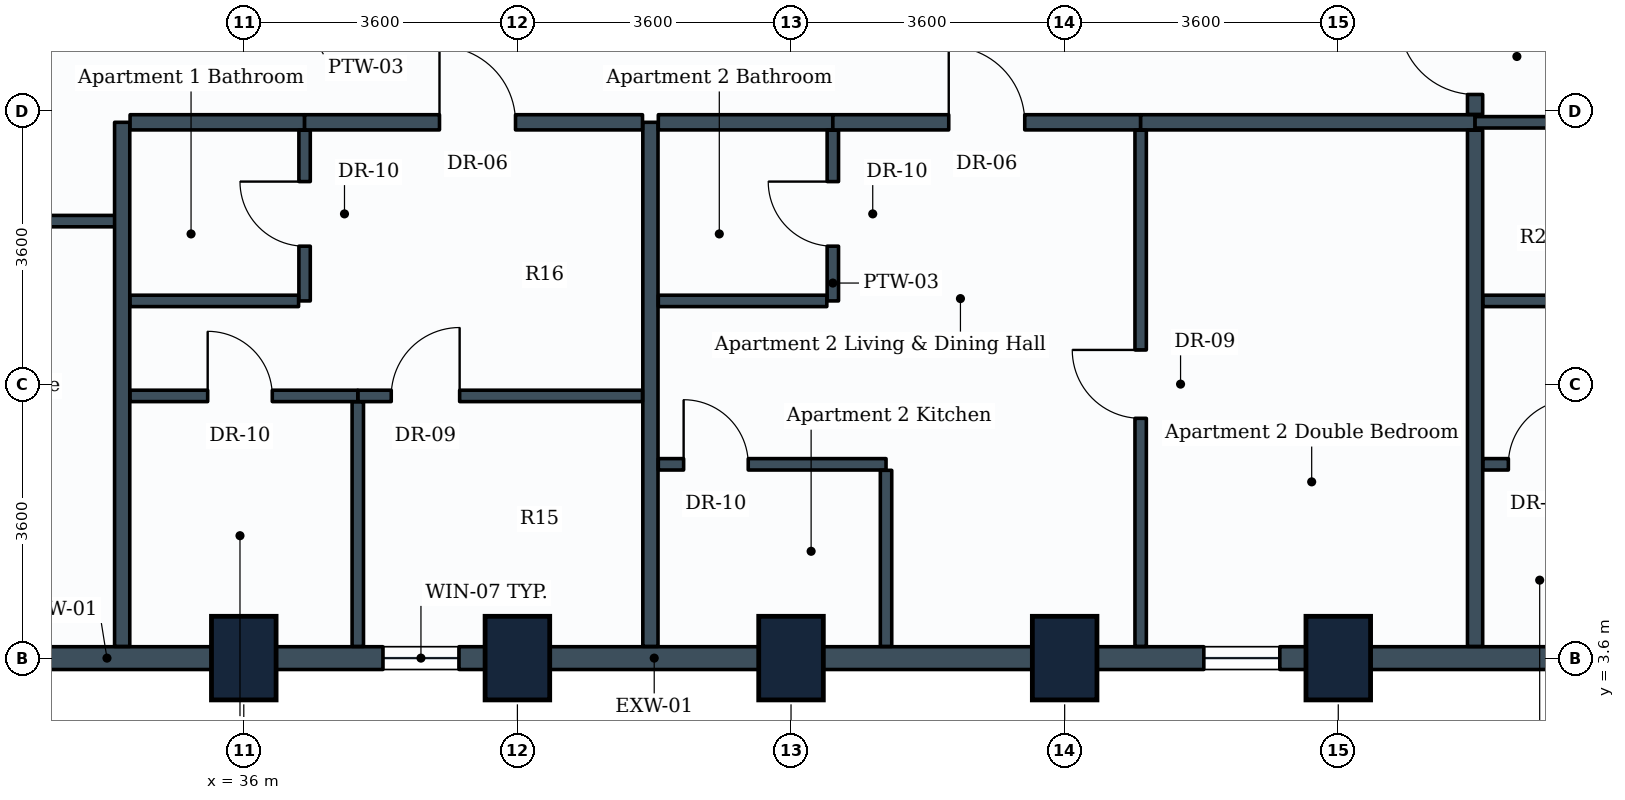
"""IFC4 building model, lengths in metres.
Left out: names, types, materials, properties, quantities, classifications, styles, units other than length and angle.
Written with IfcOpenShell. Run it as: python <this file> out.ifc"""

import sys

from ifc_helpers import new_model, si_unit, direction, frame, frame_2d, origin, origin_2d, place, context, subcontext, project, spatial, rectangle, extrude, element, fill, save


model = new_model("IFC4")
c1 = context("Model", 3, precision=1e-05, world=origin(), true_north=direction((0.0, 1.0)))
c2 = subcontext(c1, "Body", "Model", "MODEL_VIEW")
j1 = project(units=[si_unit("LENGTHUNIT", "METRE"), si_unit("PLANEANGLEUNIT", "RADIAN")], contexts=[c1])
p1 = place(None, origin())
s1 = spatial("IfcSite", under=j1, at=p1, CompositionType="ELEMENT")
p2 = place(p1, origin())
s2 = spatial("IfcBuilding", under=s1, at=p2, CompositionType="ELEMENT")
p3 = place(p2, frame((0.0, 0.0, 123.8)))
s3 = spatial("IfcBuildingStorey", under=s2, at=p3, CompositionType="ELEMENT", Elevation=123.8)
for number, where, z_axis, x_axis in (
    (1, (36.0, 3.6, 0.0), (0.0, 0.0, 1.0), (1.0, 0.0, 0.0)),
    (2, (39.6, 3.6, 0.0), (0.0, 0.0, 1.0), (1.0, 0.0, 0.0)),
    (3, (43.2, 3.6, 0.0), (0.0, 0.0, 1.0), (1.0, 0.0, 0.0)),
    (4, (46.8, 3.6, 0.0), (0.0, 0.0, 1.0), (1.0, 0.0, 0.0)),
    (5, (50.4, 3.6, 0.0), (0.0, 0.0, 1.0), (1.0, 0.0, 0.0)),
):
    element("IfcColumn", number, at=place(p3, frame(where, z_axis=z_axis, x_axis=x_axis)), inside=s3, PredefinedType="COLUMN", context=c2, shape_type="SweptSolid", body=[
        extrude(rectangle(XDim=0.85, YDim=1.1, at=origin_2d()), origin(), (0.0, 0.0, 1.0), 3.8),
    ])
p4 = place(p3, frame((36.0, 3.6, 0.0), z_axis=(0.0, 0.0, 1.0), x_axis=(-1.0, 0.0, 0.0)))
e6 = element("IfcWall", 6, at=p4, inside=s3, PredefinedType="STANDARD", context=c2, shape_type="SweptSolid", body=[
    extrude(rectangle(XDim=3.6, YDim=0.3, at=frame_2d((1.8, 0.0))), origin(), (0.0, 0.0, 1.0), 2.93),
])
p5 = place(p3, frame((39.6, 3.6, 0.0), z_axis=(0.0, 0.0, 1.0), x_axis=(-1.0, 0.0, 0.0)))
e7 = element("IfcWall", 7, at=p5, inside=s3, PredefinedType="STANDARD", context=c2, shape_type="SweptSolid", body=[
    extrude(rectangle(XDim=3.6, YDim=0.3, at=frame_2d((1.8, 0.0))), origin(), (0.0, 0.0, 1.0), 2.93),
])
p6 = place(p5, frame((0.769, 0.0, 0.85)))
e8 = element("IfcOpeningElement", 8, at=p6, cuts=e7, PredefinedType="OPENING", context=c2, shape_type="SweptSolid", body=[
    extrude(rectangle(XDim=1.0, YDim=1.35, at=frame_2d((0.5, 0.675))), frame((0.0, 0.16, 0.0), z_axis=(0.0, -1.0, 0.0), x_axis=(1.0, 0.0, 0.0)), (0.0, 0.0, 1.0), 0.32),
])
p7 = place(p3, frame((43.2, 3.6, 0.0), z_axis=(0.0, 0.0, 1.0), x_axis=(-1.0, 0.0, 0.0)))
e9 = element("IfcWall", 9, at=p7, inside=s3, PredefinedType="STANDARD", context=c2, shape_type="SweptSolid", body=[
    extrude(rectangle(XDim=3.6, YDim=0.3, at=frame_2d((1.8, 0.0))), origin(), (0.0, 0.0, 1.0), 2.93),
])
p8 = place(p3, frame((46.8, 3.6, 0.0), z_axis=(0.0, 0.0, 1.0), x_axis=(-1.0, 0.0, 0.0)))
e10 = element("IfcWall", 10, at=p8, inside=s3, PredefinedType="STANDARD", context=c2, shape_type="SweptSolid", body=[
    extrude(rectangle(XDim=3.6, YDim=0.3, at=frame_2d((1.8, 0.0))), origin(), (0.0, 0.0, 1.0), 2.93),
])
p9 = place(p3, frame((50.4, 3.6, 0.0), z_axis=(0.0, 0.0, 1.0), x_axis=(-1.0, 0.0, 0.0)))
e11 = element("IfcWall", 11, at=p9, inside=s3, PredefinedType="STANDARD", context=c2, shape_type="SweptSolid", body=[
    extrude(rectangle(XDim=3.6, YDim=0.3, at=frame_2d((1.8, 0.0))), origin(), (0.0, 0.0, 1.0), 2.93),
])
p10 = place(p9, frame((0.769, 0.0, 0.85)))
e12 = element("IfcOpeningElement", 12, at=p10, cuts=e11, PredefinedType="OPENING", context=c2, shape_type="SweptSolid", body=[
    extrude(rectangle(XDim=1.0, YDim=1.35, at=frame_2d((0.5, 0.675))), frame((0.0, 0.16, 0.0), z_axis=(0.0, -1.0, 0.0), x_axis=(1.0, 0.0, 0.0)), (0.0, 0.0, 1.0), 0.32),
])
p11 = place(p3, frame((54.0, 3.6, 0.0), z_axis=(0.0, 0.0, 1.0), x_axis=(-1.0, 0.0, 0.0)))
e13 = element("IfcWall", 13, at=p11, inside=s3, PredefinedType="STANDARD", context=c2, shape_type="SweptSolid", body=[
    extrude(rectangle(XDim=3.6, YDim=0.3, at=frame_2d((1.8, 0.0))), origin(), (0.0, 0.0, 1.0), 2.43),
])
p12 = place(p3, frame((28.879, 9.35, 0.0), z_axis=(0.0, 0.0, 1.0), x_axis=(1.0, 0.0, 0.0)))
e14 = element("IfcWall", 14, at=p12, inside=s3, PredefinedType="PARTITIONING", context=c2, shape_type="SweptSolid", body=[
    extrude(rectangle(XDim=5.521, YDim=0.15, at=frame_2d((2.76, 0.0))), origin(), (0.0, 0.0, 1.0), 3.465),
])
p13 = place(p12, frame((0.36, 0.0, 0.0)))
e15 = element("IfcOpeningElement", 15, at=p13, cuts=e14, PredefinedType="OPENING", context=c2, shape_type="SweptSolid", body=[
    extrude(rectangle(XDim=1.0, YDim=2.1, at=frame_2d((0.5, 1.05))), frame((0.0, 0.085, 0.0), z_axis=(0.0, -1.0, 0.0), x_axis=(1.0, 0.0, 0.0)), (0.0, 0.0, 1.0), 0.17),
])
for number, where, z_axis, x_axis in (
    (16, (34.4, 3.754, 0.0), (0.0, 0.0, 1.0), (0.0, 1.0, 0.0)),
    (17, (41.35, 3.754, 0.0), (0.0, 0.0, 1.0), (0.0, 1.0, 0.0)),
):
    element("IfcWall", number, at=place(p3, frame(where, z_axis=z_axis, x_axis=x_axis)), inside=s3, PredefinedType="PARTITIONING", context=c2, shape_type="SweptSolid", body=[
        extrude(rectangle(XDim=6.896, YDim=0.2, at=frame_2d((3.448, 0.0))), origin(), (0.0, 0.0, 1.0), 2.93),
    ])
p14 = place(p3, frame((34.504, 10.65, 0.0), z_axis=(0.0, 0.0, 1.0), x_axis=(1.0, 0.0, 0.0)))
e18 = element("IfcWall", 18, at=p14, inside=s3, PredefinedType="PARTITIONING", context=c2, shape_type="SweptSolid", body=[
    extrude(rectangle(XDim=2.296, YDim=0.2, at=frame_2d((1.148, 0.0))), origin(), (0.0, 0.0, 1.0), 3.01),
])
p15 = place(p3, frame((36.8, 8.3, 0.0), z_axis=(0.0, 0.0, 1.0), x_axis=(0.0, 1.0, 0.0)))
e19 = element("IfcWall", 19, at=p15, inside=s3, PredefinedType="PARTITIONING", context=c2, shape_type="SweptSolid", body=[
    extrude(rectangle(XDim=2.246, YDim=0.15, at=frame_2d((1.123, 0.0))), origin(), (0.0, 0.0, 1.0), 3.465),
])
p16 = place(p15, frame((0.72, 0.0, 0.0)))
e20 = element("IfcOpeningElement", 20, at=p16, cuts=e19, PredefinedType="OPENING", context=c2, shape_type="SweptSolid", body=[
    extrude(rectangle(XDim=0.85, YDim=2.1, at=frame_2d((0.425, 1.05))), frame((0.0, 0.085, 0.0), z_axis=(0.0, -1.0, 0.0), x_axis=(1.0, 0.0, 0.0)), (0.0, 0.0, 1.0), 0.17),
])
p17 = place(p3, frame((34.504, 8.3, 0.0), z_axis=(0.0, 0.0, 1.0), x_axis=(1.0, 0.0, 0.0)))
e21 = element("IfcWall", 21, at=p17, inside=s3, PredefinedType="PARTITIONING", context=c2, shape_type="SweptSolid", body=[
    extrude(rectangle(XDim=2.217, YDim=0.15, at=frame_2d((1.108, 0.0))), origin(), (0.0, 0.0, 1.0), 3.1),
])
p18 = place(p3, frame((36.8, 10.65, 0.0), z_axis=(0.0, 0.0, 1.0), x_axis=(1.0, 0.0, 0.0)))
e22 = element("IfcWall", 22, at=p18, inside=s3, PredefinedType="PARTITIONING", context=c2, shape_type="SweptSolid", body=[
    extrude(rectangle(XDim=4.446, YDim=0.2, at=frame_2d((2.223, 0.0))), origin(), (0.0, 0.0, 1.0), 3.01),
])
p19 = place(p18, frame((1.775, 0.0, 0.0)))
e23 = element("IfcOpeningElement", 23, at=p19, cuts=e22, PredefinedType="OPENING", context=c2, shape_type="SweptSolid", body=[
    extrude(rectangle(XDim=1.0, YDim=2.1, at=frame_2d((0.5, 1.05))), frame((0.0, 0.11, 0.0), z_axis=(0.0, -1.0, 0.0), x_axis=(1.0, 0.0, 0.0)), (0.0, 0.0, 1.0), 0.22),
])
p20 = place(p3, frame((37.5, 7.05, 0.0), z_axis=(0.0, 0.0, 1.0), x_axis=(1.0, 0.0, 0.0)))
e24 = element("IfcWall", 24, at=p20, inside=s3, PredefinedType="PARTITIONING", context=c2, shape_type="SweptSolid", body=[
    extrude(rectangle(XDim=3.746, YDim=0.15, at=frame_2d((1.873, 0.0))), origin(), (0.0, 0.0, 1.0), 3.01),
])
p21 = place(p20, frame((0.44, 0.0, 0.0)))
e25 = element("IfcOpeningElement", 25, at=p21, cuts=e24, PredefinedType="OPENING", context=c2, shape_type="SweptSolid", body=[
    extrude(rectangle(XDim=0.9, YDim=2.1, at=frame_2d((0.45, 1.05))), frame((0.0, 0.085, 0.0), z_axis=(0.0, -1.0, 0.0), x_axis=(1.0, 0.0, 0.0)), (0.0, 0.0, 1.0), 0.17),
])
p22 = place(p3, frame((34.504, 7.05, 0.0), z_axis=(0.0, 0.0, 1.0), x_axis=(1.0, 0.0, 0.0)))
e26 = element("IfcWall", 26, at=p22, inside=s3, PredefinedType="PARTITIONING", context=c2, shape_type="SweptSolid", body=[
    extrude(rectangle(XDim=2.996, YDim=0.15, at=frame_2d((1.498, 0.0))), origin(), (0.0, 0.0, 1.0), 3.01),
])
p23 = place(p22, frame((1.021, 0.0, 0.0)))
e27 = element("IfcOpeningElement", 27, at=p23, cuts=e26, PredefinedType="OPENING", context=c2, shape_type="SweptSolid", body=[
    extrude(rectangle(XDim=0.85, YDim=2.1, at=frame_2d((0.425, 1.05))), frame((0.0, 0.085, 0.0), z_axis=(0.0, -1.0, 0.0), x_axis=(1.0, 0.0, 0.0)), (0.0, 0.0, 1.0), 0.17),
])
p24 = place(p3, frame((37.5, 3.754, 0.0), z_axis=(0.0, 0.0, 1.0), x_axis=(0.0, 1.0, 0.0)))
e28 = element("IfcWall", 28, at=p24, inside=s3, PredefinedType="PARTITIONING", context=c2, shape_type="SweptSolid", body=[
    extrude(rectangle(XDim=3.217, YDim=0.15, at=frame_2d((1.608, 0.0))), origin(), (0.0, 0.0, 1.0), 2.93),
])
p25 = place(p3, frame((41.454, 10.65, 0.0), z_axis=(0.0, 0.0, 1.0), x_axis=(1.0, 0.0, 0.0)))
e29 = element("IfcWall", 29, at=p25, inside=s3, PredefinedType="PARTITIONING", context=c2, shape_type="SweptSolid", body=[
    extrude(rectangle(XDim=2.296, YDim=0.2, at=frame_2d((1.148, 0.0))), origin(), (0.0, 0.0, 1.0), 3.06),
])
p26 = place(p3, frame((43.75, 8.3, 0.0), z_axis=(0.0, 0.0, 1.0), x_axis=(0.0, 1.0, 0.0)))
e30 = element("IfcWall", 30, at=p26, inside=s3, PredefinedType="PARTITIONING", context=c2, shape_type="SweptSolid", body=[
    extrude(rectangle(XDim=2.246, YDim=0.15, at=frame_2d((1.123, 0.0))), origin(), (0.0, 0.0, 1.0), 3.465),
])
p27 = place(p26, frame((0.72, 0.0, 0.0)))
e31 = element("IfcOpeningElement", 31, at=p27, cuts=e30, PredefinedType="OPENING", context=c2, shape_type="SweptSolid", body=[
    extrude(rectangle(XDim=0.85, YDim=2.1, at=frame_2d((0.425, 1.05))), frame((0.0, 0.085, 0.0), z_axis=(0.0, -1.0, 0.0), x_axis=(1.0, 0.0, 0.0)), (0.0, 0.0, 1.0), 0.17),
])
p28 = place(p3, frame((41.454, 8.3, 0.0), z_axis=(0.0, 0.0, 1.0), x_axis=(1.0, 0.0, 0.0)))
e32 = element("IfcWall", 32, at=p28, inside=s3, PredefinedType="PARTITIONING", context=c2, shape_type="SweptSolid", body=[
    extrude(rectangle(XDim=2.217, YDim=0.15, at=frame_2d((1.108, 0.0))), origin(), (0.0, 0.0, 1.0), 3.15),
])
p29 = place(p3, frame((43.75, 10.65, 0.0), z_axis=(0.0, 0.0, 1.0), x_axis=(1.0, 0.0, 0.0)))
e33 = element("IfcWall", 33, at=p29, inside=s3, PredefinedType="PARTITIONING", context=c2, shape_type="SweptSolid", body=[
    extrude(rectangle(XDim=4.05, YDim=0.2, at=frame_2d((2.025, 0.0))), origin(), (0.0, 0.0, 1.0), 3.1),
])
p30 = place(p29, frame((1.525, 0.0, 0.0)))
e34 = element("IfcOpeningElement", 34, at=p30, cuts=e33, PredefinedType="OPENING", context=c2, shape_type="SweptSolid", body=[
    extrude(rectangle(XDim=1.0, YDim=2.1, at=frame_2d((0.5, 1.05))), frame((0.0, 0.11, 0.0), z_axis=(0.0, -1.0, 0.0), x_axis=(1.0, 0.0, 0.0)), (0.0, 0.0, 1.0), 0.22),
])
p31 = place(p3, frame((47.8, 10.65, 0.0), z_axis=(0.0, 0.0, 1.0), x_axis=(1.0, 0.0, 0.0)))
e35 = element("IfcWall", 35, at=p31, inside=s3, PredefinedType="PARTITIONING", context=c2, shape_type="SweptSolid", body=[
    extrude(rectangle(XDim=4.4, YDim=0.2, at=frame_2d((2.2, 0.0))), origin(), (0.0, 0.0, 1.0), 3.465),
])
p32 = place(p3, frame((47.8, 3.754, 0.0), z_axis=(0.0, 0.0, 1.0), x_axis=(0.0, 1.0, 0.0)))
e36 = element("IfcWall", 36, at=p32, inside=s3, PredefinedType="PARTITIONING", context=c2, shape_type="SweptSolid", body=[
    extrude(rectangle(XDim=6.792, YDim=0.15, at=frame_2d((3.396, 0.0))), origin(), (0.0, 0.0, 1.0), 2.93),
])
p33 = place(p32, frame((3.001, 0.0, 0.0)))
e37 = element("IfcOpeningElement", 37, at=p33, cuts=e36, PredefinedType="OPENING", context=c2, shape_type="SweptSolid", body=[
    extrude(rectangle(XDim=0.9, YDim=2.1, at=frame_2d((0.45, 1.05))), frame((0.0, 0.085, 0.0), z_axis=(0.0, -1.0, 0.0), x_axis=(1.0, 0.0, 0.0)), (0.0, 0.0, 1.0), 0.17),
])
p34 = place(p3, frame((41.454, 6.15, 0.0), z_axis=(0.0, 0.0, 1.0), x_axis=(1.0, 0.0, 0.0)))
e38 = element("IfcWall", 38, at=p34, inside=s3, PredefinedType="PARTITIONING", context=c2, shape_type="SweptSolid", body=[
    extrude(rectangle(XDim=2.996, YDim=0.15, at=frame_2d((1.498, 0.0))), origin(), (0.0, 0.0, 1.0), 3.15),
])
p35 = place(p34, frame((0.333, 0.0, 0.0)))
e39 = element("IfcOpeningElement", 39, at=p35, cuts=e38, PredefinedType="OPENING", context=c2, shape_type="SweptSolid", body=[
    extrude(rectangle(XDim=0.85, YDim=2.1, at=frame_2d((0.425, 1.05))), frame((0.0, 0.085, 0.0), z_axis=(0.0, -1.0, 0.0), x_axis=(1.0, 0.0, 0.0)), (0.0, 0.0, 1.0), 0.17),
])
p36 = place(p3, frame((44.45, 3.754, 0.0), z_axis=(0.0, 0.0, 1.0), x_axis=(0.0, 1.0, 0.0)))
e40 = element("IfcWall", 40, at=p36, inside=s3, PredefinedType="PARTITIONING", context=c2, shape_type="SweptSolid", body=[
    extrude(rectangle(XDim=2.317, YDim=0.15, at=frame_2d((1.159, 0.0))), origin(), (0.0, 0.0, 1.0), 2.93),
])
p37 = place(p3, frame((52.2, 3.754, 0.0), z_axis=(0.0, 0.0, 1.0), x_axis=(0.0, 1.0, 0.0)))
e41 = element("IfcWall", 41, at=p37, inside=s3, PredefinedType="PARTITIONING", context=c2, shape_type="SweptSolid", body=[
    extrude(rectangle(XDim=6.792, YDim=0.2, at=frame_2d((3.396, 0.0))), origin(), (0.0, 0.0, 1.0), 3.465),
])
p38 = place(p3, frame((52.2, 10.754, 0.0), z_axis=(0.0, 0.0, 1.0), x_axis=(0.0, 1.0, 0.0)))
e42 = element("IfcWall", 42, at=p38, inside=s3, PredefinedType="PARTITIONING", context=c2, shape_type="SweptSolid", body=[
    extrude(rectangle(XDim=1.667, YDim=0.2, at=frame_2d((0.833, 0.0))), origin(), (0.0, 0.0, 1.0), 3.465),
])
p39 = place(p38, frame((0.262, 0.0, 0.0)))
e43 = element("IfcOpeningElement", 43, at=p39, cuts=e42, PredefinedType="OPENING", context=c2, shape_type="SweptSolid", body=[
    extrude(rectangle(XDim=1.0, YDim=2.1, at=frame_2d((0.5, 1.05))), frame((0.0, 0.11, 0.0), z_axis=(0.0, -1.0, 0.0), x_axis=(1.0, 0.0, 0.0)), (0.0, 0.0, 1.0), 0.22),
])
p40 = place(p3, frame((52.2, 10.65, 0.0), z_axis=(0.0, 0.0, 1.0), x_axis=(1.0, 0.0, 0.0)))
e44 = element("IfcWall", 44, at=p40, inside=s3, PredefinedType="PARTITIONING", context=c2, shape_type="SweptSolid", body=[
    extrude(rectangle(XDim=2.4, YDim=0.15, at=frame_2d((1.2, 0.0))), origin(), (0.0, 0.0, 1.0), 2.43),
])
p41 = place(p3, frame((52.304, 8.3, 0.0), z_axis=(0.0, 0.0, 1.0), x_axis=(1.0, 0.0, 0.0)))
e45 = element("IfcWall", 45, at=p41, inside=s3, PredefinedType="PARTITIONING", context=c2, shape_type="SweptSolid", body=[
    extrude(rectangle(XDim=2.217, YDim=0.15, at=frame_2d((1.108, 0.0))), origin(), (0.0, 0.0, 1.0), 2.43),
])
p42 = place(p3, frame((52.304, 6.15, 0.0), z_axis=(0.0, 0.0, 1.0), x_axis=(1.0, 0.0, 0.0)))
e46 = element("IfcWall", 46, at=p42, inside=s3, PredefinedType="PARTITIONING", context=c2, shape_type="SweptSolid", body=[
    extrude(rectangle(XDim=3.342, YDim=0.15, at=frame_2d((1.671, 0.0))), origin(), (0.0, 0.0, 1.0), 2.43),
])
p43 = place(p42, frame((0.334, 0.0, 0.0)))
e47 = element("IfcOpeningElement", 47, at=p43, cuts=e46, PredefinedType="OPENING", context=c2, shape_type="SweptSolid", body=[
    extrude(rectangle(XDim=0.85, YDim=2.1, at=frame_2d((0.425, 1.05))), frame((0.0, 0.085, 0.0), z_axis=(0.0, -1.0, 0.0), x_axis=(1.0, 0.0, 0.0)), (0.0, 0.0, 1.0), 0.17),
])
p44 = place(p16, origin())
e48 = element("IfcDoor", 48, at=p44, inside=s3, OperationType="SINGLE_SWING_RIGHT", PredefinedType="DOOR", context=c2, shape_type="SweptSolid", body=[
    extrude(rectangle(XDim=0.85, YDim=2.1, at=frame_2d((0.425, 1.05))), frame((0.0, 0.025, 0.0), z_axis=(0.0, -1.0, 0.0), x_axis=(1.0, 0.0, 0.0)), (0.0, 0.0, 1.0), 0.05),
])
fill(e20, e48)
p45 = place(p19, origin())
e49 = element("IfcDoor", 49, at=p45, inside=s3, OperationType="SINGLE_SWING_LEFT", PredefinedType="DOOR", context=c2, shape_type="SweptSolid", body=[
    extrude(rectangle(XDim=1.0, YDim=2.1, at=frame_2d((0.5, 1.05))), frame((0.0, 0.025, 0.0), z_axis=(0.0, -1.0, 0.0), x_axis=(1.0, 0.0, 0.0)), (0.0, 0.0, 1.0), 0.05),
])
fill(e23, e49)
p46 = place(p21, origin())
e50 = element("IfcDoor", 50, at=p46, inside=s3, OperationType="SINGLE_SWING_RIGHT", PredefinedType="DOOR", context=c2, shape_type="SweptSolid", body=[
    extrude(rectangle(XDim=0.9, YDim=2.1, at=frame_2d((0.45, 1.05))), frame((0.0, 0.025, 0.0), z_axis=(0.0, -1.0, 0.0), x_axis=(1.0, 0.0, 0.0)), (0.0, 0.0, 1.0), 0.05),
])
fill(e25, e50)
p47 = place(p23, origin())
e51 = element("IfcDoor", 51, at=p47, inside=s3, OperationType="SINGLE_SWING_LEFT", PredefinedType="DOOR", context=c2, shape_type="SweptSolid", body=[
    extrude(rectangle(XDim=0.85, YDim=2.1, at=frame_2d((0.425, 1.05))), frame((0.0, 0.025, 0.0), z_axis=(0.0, -1.0, 0.0), x_axis=(1.0, 0.0, 0.0)), (0.0, 0.0, 1.0), 0.05),
])
fill(e27, e51)
p48 = place(p27, origin())
e52 = element("IfcDoor", 52, at=p48, inside=s3, OperationType="SINGLE_SWING_RIGHT", PredefinedType="DOOR", context=c2, shape_type="SweptSolid", body=[
    extrude(rectangle(XDim=0.85, YDim=2.1, at=frame_2d((0.425, 1.05))), frame((0.0, 0.025, 0.0), z_axis=(0.0, -1.0, 0.0), x_axis=(1.0, 0.0, 0.0)), (0.0, 0.0, 1.0), 0.05),
])
fill(e31, e52)
p49 = place(p30, origin())
e53 = element("IfcDoor", 53, at=p49, inside=s3, OperationType="SINGLE_SWING_LEFT", PredefinedType="DOOR", context=c2, shape_type="SweptSolid", body=[
    extrude(rectangle(XDim=1.0, YDim=2.1, at=frame_2d((0.5, 1.05))), frame((0.0, 0.025, 0.0), z_axis=(0.0, -1.0, 0.0), x_axis=(1.0, 0.0, 0.0)), (0.0, 0.0, 1.0), 0.05),
])
fill(e34, e53)
p50 = place(p33, origin())
e54 = element("IfcDoor", 54, at=p50, inside=s3, OperationType="SINGLE_SWING_RIGHT", PredefinedType="DOOR", context=c2, shape_type="SweptSolid", body=[
    extrude(rectangle(XDim=0.9, YDim=2.1, at=frame_2d((0.45, 1.05))), frame((0.0, 0.025, 0.0), z_axis=(0.0, -1.0, 0.0), x_axis=(1.0, 0.0, 0.0)), (0.0, 0.0, 1.0), 0.05),
])
fill(e37, e54)
p51 = place(p35, origin())
e55 = element("IfcDoor", 55, at=p51, inside=s3, OperationType="SINGLE_SWING_LEFT", PredefinedType="DOOR", context=c2, shape_type="SweptSolid", body=[
    extrude(rectangle(XDim=0.85, YDim=2.1, at=frame_2d((0.425, 1.05))), frame((0.0, 0.025, 0.0), z_axis=(0.0, -1.0, 0.0), x_axis=(1.0, 0.0, 0.0)), (0.0, 0.0, 1.0), 0.05),
])
fill(e39, e55)
p52 = place(p39, origin())
e56 = element("IfcDoor", 56, at=p52, inside=s3, OperationType="SINGLE_SWING_RIGHT", PredefinedType="DOOR", context=c2, shape_type="SweptSolid", body=[
    extrude(rectangle(XDim=1.0, YDim=2.1, at=frame_2d((0.5, 1.05))), frame((0.0, 0.025, 0.0), z_axis=(0.0, -1.0, 0.0), x_axis=(1.0, 0.0, 0.0)), (0.0, 0.0, 1.0), 0.05),
])
fill(e43, e56)
p53 = place(p43, origin())
e57 = element("IfcDoor", 57, at=p53, inside=s3, OperationType="SINGLE_SWING_RIGHT", PredefinedType="DOOR", context=c2, shape_type="SweptSolid", body=[
    extrude(rectangle(XDim=0.85, YDim=2.1, at=frame_2d((0.425, 1.05))), frame((0.0, 0.025, 0.0), z_axis=(0.0, -1.0, 0.0), x_axis=(1.0, 0.0, 0.0)), (0.0, 0.0, 1.0), 0.05),
])
fill(e47, e57)
p54 = place(p6, origin())
e58 = element("IfcWindow", 58, at=p54, inside=s3, PartitioningType="SINGLE_PANEL", PredefinedType="WINDOW", context=c2, shape_type="SweptSolid", body=[
    extrude(rectangle(XDim=1.0, YDim=1.35, at=frame_2d((0.5, 0.675))), frame((0.0, 0.03, 0.0), z_axis=(0.0, -1.0, 0.0), x_axis=(1.0, 0.0, 0.0)), (0.0, 0.0, 1.0), 0.06),
])
fill(e8, e58)
p55 = place(p10, origin())
e59 = element("IfcWindow", 59, at=p55, inside=s3, PartitioningType="SINGLE_PANEL", PredefinedType="WINDOW", context=c2, shape_type="SweptSolid", body=[
    extrude(rectangle(XDim=1.0, YDim=1.35, at=frame_2d((0.5, 0.675))), frame((0.0, 0.03, 0.0), z_axis=(0.0, -1.0, 0.0), x_axis=(1.0, 0.0, 0.0)), (0.0, 0.0, 1.0), 0.06),
])
fill(e12, e59)
save(model, sys.argv[1])
